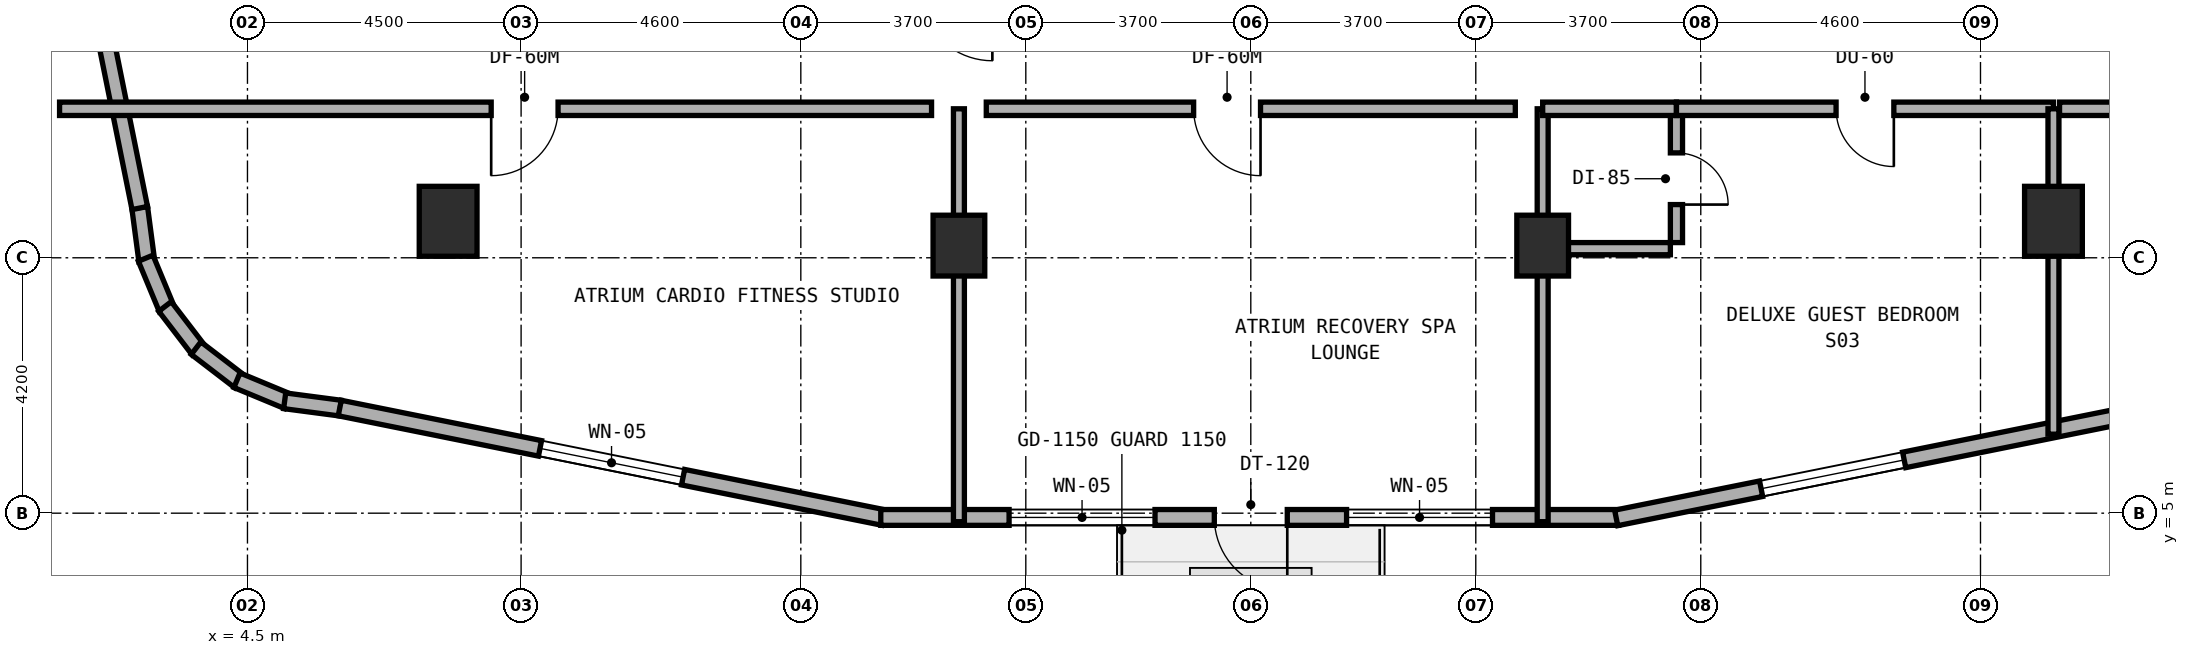
"""IFC4 building model, lengths in metres.
Left out: names, types, materials, properties, quantities, classifications, styles, units other than length and angle.
Written with IfcOpenShell. Run it as: python <this file> out.ifc"""

import sys

from ifc_helpers import new_model, si_unit, direction, frame, frame_2d, origin, origin_2d, place, context, subcontext, project, spatial, rectangle, extrude, element, fill, save


model = new_model("IFC4")
c1 = context("Model", 3, precision=1e-05, world=origin(), true_north=direction((0.0, 1.0)))
c2 = subcontext(c1, "Body", "Model", "MODEL_VIEW")
j1 = project(units=[si_unit("LENGTHUNIT", "METRE"), si_unit("PLANEANGLEUNIT", "RADIAN")], contexts=[c1])
p1 = place(None, origin())
s1 = spatial("IfcSite", under=j1, at=p1, CompositionType="ELEMENT")
p2 = place(p1, origin())
s2 = spatial("IfcBuilding", under=s1, at=p2, CompositionType="ELEMENT")
p3 = place(p2, frame((0.0, 0.0, 124.0)))
s3 = spatial("IfcBuildingStorey", under=s2, at=p3, CompositionType="ELEMENT", Elevation=124.0)
for number, where, z_axis, x_axis in (
    (1, (16.2, 9.4, 0.0), (0.0, 0.0, 1.0), (1.0, 0.0, 0.0)),
    (2, (25.8, 9.4, 0.0), (0.0, 0.0, 1.0), (1.0, 0.0, 0.0)),
):
    element("IfcColumn", number, at=place(p3, frame(where, z_axis=z_axis, x_axis=x_axis)), inside=s3, PredefinedType="COLUMN", context=c2, shape_type="SweptSolid", body=[
        extrude(rectangle(XDim=0.85, YDim=1.0, at=origin_2d()), origin(), (0.0, 0.0, 1.0), 3.5),
    ])
for number, where, z_axis, x_axis in (
    (3, (7.8, 9.8, 0.0), (0.0, 0.0, 1.0), (1.0, 0.0, 0.0)),
    (4, (34.2, 9.8, 0.0), (0.0, 0.0, 1.0), (1.0, 0.0, 0.0)),
):
    element("IfcColumn", number, at=place(p3, frame(where, z_axis=z_axis, x_axis=x_axis)), inside=s3, PredefinedType="COLUMN", context=c2, shape_type="SweptSolid", body=[
        extrude(rectangle(XDim=0.95, YDim=1.15, at=origin_2d()), origin(), (0.0, 0.0, 1.0), 3.5),
    ])
p4 = place(p3, frame((2.728, 10.025, 0.0), z_axis=(0.0, 0.0, 1.0), x_axis=(0.130953706898, -0.991388484223, 0.0)))
e5 = element("IfcWall", 5, at=p4, inside=s3, PredefinedType="STANDARD", context=c2, shape_type="SweptSolid", body=[
    extrude(rectangle(XDim=0.885, YDim=0.26, at=frame_2d((0.443, 0.0))), origin(), (0.0, 0.0, 1.0), 3.22),
])
p5 = place(p3, frame((2.826, 9.193, 0.0), z_axis=(0.0, 0.0, 1.0), x_axis=(0.383290660547, -0.923627776508, 0.0)))
e6 = element("IfcWall", 6, at=p5, inside=s3, PredefinedType="STANDARD", context=c2, shape_type="SweptSolid", body=[
    extrude(rectangle(XDim=0.903, YDim=0.26, at=frame_2d((0.452, 0.0))), origin(), (0.0, 0.0, 1.0), 3.22),
])
p6 = place(p3, frame((3.144, 8.399, 0.0), z_axis=(0.0, 0.0, 1.0), x_axis=(0.608624690463, -0.793458244748, 0.0)))
e7 = element("IfcWall", 7, at=p6, inside=s3, PredefinedType="STANDARD", context=c2, shape_type="SweptSolid", body=[
    extrude(rectangle(XDim=0.902, YDim=0.26, at=frame_2d((0.451, 0.0))), origin(), (0.0, 0.0, 1.0), 3.22),
])
p7 = place(p3, frame((3.655, 7.714, 0.0), z_axis=(0.0, 0.0, 1.0), x_axis=(0.793558456666, -0.608494022858, 0.0)))
e8 = element("IfcWall", 8, at=p7, inside=s3, PredefinedType="STANDARD", context=c2, shape_type="SweptSolid", body=[
    extrude(rectangle(XDim=0.902, YDim=0.26, at=frame_2d((0.451, 0.0))), origin(), (0.0, 0.0, 1.0), 3.22),
])
p8 = place(p3, frame((4.327, 7.186, 0.0), z_axis=(0.0, 0.0, 1.0), x_axis=(0.923683767999, -0.383155708213, 0.0)))
e9 = element("IfcWall", 9, at=p8, inside=s3, PredefinedType="STANDARD", context=c2, shape_type="SweptSolid", body=[
    extrude(rectangle(XDim=0.903, YDim=0.26, at=frame_2d((0.451, 0.0))), origin(), (0.0, 0.0, 1.0), 3.22),
])
p9 = place(p3, frame((5.112, 6.848, 0.0), z_axis=(0.0, 0.0, 1.0), x_axis=(0.991487658083, -0.130200706103, 0.0)))
e10 = element("IfcWall", 10, at=p9, inside=s3, PredefinedType="STANDARD", context=c2, shape_type="SweptSolid", body=[
    extrude(rectangle(XDim=0.921, YDim=0.26, at=frame_2d((0.46, 0.0))), origin(), (0.0, 0.0, 1.0), 3.22),
])
p10 = place(p3, frame((6.018, 6.729, 0.0), z_axis=(0.0, 0.0, 1.0), x_axis=(0.980317172899, -0.197429077186, 0.0)))
e11 = element("IfcWall", 11, at=p10, inside=s3, PredefinedType="STANDARD", context=c2, shape_type="SweptSolid", body=[
    extrude(rectangle(XDim=9.117, YDim=0.26, at=frame_2d((4.559, 0.0))), origin(), (0.0, 0.0, 1.0), 3.22),
])
p11 = place(p10, frame((3.359, 0.0, 0.8)))
e12 = element("IfcOpeningElement", 12, at=p11, cuts=e11, PredefinedType="OPENING", context=c2, shape_type="SweptSolid", body=[
    extrude(rectangle(XDim=2.4, YDim=1.6, at=frame_2d((1.2, 0.8))), frame((0.0, 0.14, 0.0), z_axis=(0.0, -1.0, 0.0), x_axis=(1.0, 0.0, 0.0)), (0.0, 0.0, 1.0), 0.28),
])
p12 = place(p3, frame((14.915, 4.93, 0.0), z_axis=(0.0, 0.0, 1.0), x_axis=(1.0, 0.0, 0.0)))
e13 = element("IfcWall", 13, at=p12, inside=s3, PredefinedType="STANDARD", context=c2, shape_type="SweptSolid", body=[
    extrude(rectangle(XDim=12.135, YDim=0.26, at=frame_2d((6.067, 0.0))), origin(), (0.0, 0.0, 1.0), 3.22),
])
p13 = place(p12, frame((5.485, 0.0, 0.0)))
e14 = element("IfcOpeningElement", 14, at=p13, cuts=e13, PredefinedType="OPENING", context=c2, shape_type="SweptSolid", body=[
    extrude(rectangle(XDim=1.2, YDim=2.15, at=frame_2d((0.6, 1.075))), frame((0.0, 0.14, 0.0), z_axis=(0.0, -1.0, 0.0), x_axis=(1.0, 0.0, 0.0)), (0.0, 0.0, 1.0), 0.28),
])
p14 = place(p12, frame((2.11, 0.0, 0.8)))
e15 = element("IfcOpeningElement", 15, at=p14, cuts=e13, PredefinedType="OPENING", context=c2, shape_type="SweptSolid", body=[
    extrude(rectangle(XDim=2.4, YDim=1.6, at=frame_2d((1.2, 0.8))), frame((0.0, 0.14, 0.0), z_axis=(0.0, -1.0, 0.0), x_axis=(1.0, 0.0, 0.0)), (0.0, 0.0, 1.0), 0.28),
])
p15 = place(p12, frame((7.66, 0.0, 0.8)))
e16 = element("IfcOpeningElement", 16, at=p15, cuts=e13, PredefinedType="OPENING", context=c2, shape_type="SweptSolid", body=[
    extrude(rectangle(XDim=2.4, YDim=1.6, at=frame_2d((1.2, 0.8))), frame((0.0, 0.14, 0.0), z_axis=(0.0, -1.0, 0.0), x_axis=(1.0, 0.0, 0.0)), (0.0, 0.0, 1.0), 0.28),
])
p16 = place(p3, frame((27.009, 4.922, 0.0), z_axis=(0.0, 0.0, 1.0), x_axis=(0.980321298532, 0.197408590603, 0.0)))
e17 = element("IfcWall", 17, at=p16, inside=s3, PredefinedType="STANDARD", context=c2, shape_type="SweptSolid", body=[
    extrude(rectangle(XDim=9.153, YDim=0.26, at=frame_2d((4.577, 0.0))), origin(), (0.0, 0.0, 1.0), 3.22),
])
p17 = place(p16, frame((2.431, 0.0, 0.8)))
e18 = element("IfcOpeningElement", 18, at=p17, cuts=e17, PredefinedType="OPENING", context=c2, shape_type="SweptSolid", body=[
    extrude(rectangle(XDim=2.4, YDim=1.6, at=frame_2d((1.2, 0.8))), frame((0.0, 0.14, 0.0), z_axis=(0.0, -1.0, 0.0), x_axis=(1.0, 0.0, 0.0)), (0.0, 0.0, 1.0), 0.28),
])
p18 = place(p3, frame((0.916, 19.02, 0.0), z_axis=(0.0, 0.0, 1.0), x_axis=(0.197435082048, -0.980315963543, 0.0)))
e19 = element("IfcWall", 19, at=p18, inside=s3, PredefinedType="STANDARD", context=c2, shape_type="SweptSolid", body=[
    extrude(rectangle(XDim=9.183, YDim=0.26, at=frame_2d((4.591, 0.0))), origin(), (0.0, 0.0, 1.0), 3.22),
])
p19 = place(p18, frame((2.497, 0.0, 0.8)))
e20 = element("IfcOpeningElement", 20, at=p19, cuts=e19, PredefinedType="OPENING", context=c2, shape_type="SweptSolid", body=[
    extrude(rectangle(XDim=2.4, YDim=1.6, at=frame_2d((1.2, 0.8))), frame((0.0, 0.14, 0.0), z_axis=(0.0, -1.0, 0.0), x_axis=(1.0, 0.0, 0.0)), (0.0, 0.0, 1.0), 0.28),
])
p20 = place(p3, frame((1.41, 11.65, 0.0), z_axis=(0.0, 0.0, 1.0), x_axis=(1.0, 0.0, 0.0)))
e21 = element("IfcWall", 21, at=p20, inside=s3, PredefinedType="SOLIDWALL", context=c2, shape_type="SweptSolid", body=[
    extrude(rectangle(XDim=14.34, YDim=0.22, at=frame_2d((7.17, 0.0))), origin(), (0.0, 0.0, 1.0), 2.695),
])
p21 = place(p20, frame((7.098, 0.0, 0.0)))
e22 = element("IfcOpeningElement", 22, at=p21, cuts=e21, PredefinedType="OPENING", context=c2, shape_type="SweptSolid", body=[
    extrude(rectangle(XDim=1.1, YDim=2.1, at=frame_2d((0.55, 1.05))), frame((0.0, 0.12, 0.0), z_axis=(0.0, -1.0, 0.0), x_axis=(1.0, 0.0, 0.0)), (0.0, 0.0, 1.0), 0.24),
])
p22 = place(p3, frame((16.2, 4.86, 0.0), z_axis=(0.0, 0.0, 1.0), x_axis=(0.0, 1.0, 0.0)))
e23 = element("IfcWall", 23, at=p22, inside=s3, PredefinedType="SOLIDWALL", context=c2, shape_type="SweptSolid", body=[
    extrude(rectangle(XDim=6.79, YDim=0.18, at=frame_2d((3.395, 0.0))), origin(), (0.0, 0.0, 1.0), 2.695),
])
p23 = place(p3, frame((16.65, 11.65, 0.0), z_axis=(0.0, 0.0, 1.0), x_axis=(1.0, 0.0, 0.0)))
e24 = element("IfcWall", 24, at=p23, inside=s3, PredefinedType="SOLIDWALL", context=c2, shape_type="SweptSolid", body=[
    extrude(rectangle(XDim=8.7, YDim=0.22, at=frame_2d((4.35, 0.0))), origin(), (0.0, 0.0, 1.0), 3.22),
])
p24 = place(p23, frame((3.41, 0.0, 0.0)))
e25 = element("IfcOpeningElement", 25, at=p24, cuts=e24, PredefinedType="OPENING", context=c2, shape_type="SweptSolid", body=[
    extrude(rectangle(XDim=1.1, YDim=2.1, at=frame_2d((0.55, 1.05))), frame((0.0, 0.12, 0.0), z_axis=(0.0, -1.0, 0.0), x_axis=(1.0, 0.0, 0.0)), (0.0, 0.0, 1.0), 0.24),
])
p25 = place(p3, frame((25.8, 4.86, 0.0), z_axis=(0.0, 0.0, 1.0), x_axis=(0.0, 1.0, 0.0)))
e26 = element("IfcWall", 26, at=p25, inside=s3, PredefinedType="SOLIDWALL", context=c2, shape_type="SweptSolid", body=[
    extrude(rectangle(XDim=6.79, YDim=0.18, at=frame_2d((3.395, 0.0))), origin(), (0.0, 0.0, 1.0), 2.695),
])
p26 = place(p3, frame((28.0, 9.45, 0.0), z_axis=(0.0, 0.0, 1.0), x_axis=(0.0, 1.0, 0.0)))
e27 = element("IfcWall", 27, at=p26, inside=s3, PredefinedType="PLUMBINGWALL", context=c2, shape_type="SweptSolid", body=[
    extrude(rectangle(XDim=2.1, YDim=0.2, at=frame_2d((1.05, 0.0))), origin(), (0.0, 0.0, 1.0), 2.835),
])
p27 = place(p26, frame((0.625, 0.0, 0.0)))
e28 = element("IfcOpeningElement", 28, at=p27, cuts=e27, PredefinedType="OPENING", context=c2, shape_type="SweptSolid", body=[
    extrude(rectangle(XDim=0.85, YDim=2.1, at=frame_2d((0.425, 1.05))), frame((0.0, 0.11, 0.0), z_axis=(0.0, -1.0, 0.0), x_axis=(1.0, 0.0, 0.0)), (0.0, 0.0, 1.0), 0.22),
])
p28 = place(p3, frame((25.9, 9.35, 0.0), z_axis=(0.0, 0.0, 1.0), x_axis=(1.0, 0.0, 0.0)))
e29 = element("IfcWall", 29, at=p28, inside=s3, PredefinedType="PLUMBINGWALL", context=c2, shape_type="SweptSolid", body=[
    extrude(rectangle(XDim=2.0, YDim=0.2, at=frame_2d((1.0, 0.0))), origin(), (0.0, 0.0, 1.0), 2.835),
])
p29 = place(p3, frame((25.8, 11.65, 0.0), z_axis=(0.0, 0.0, 1.0), x_axis=(1.0, 0.0, 0.0)))
e30 = element("IfcWall", 30, at=p29, inside=s3, PredefinedType="SOLIDWALL", context=c2, shape_type="SweptSolid", body=[
    extrude(rectangle(XDim=2.2, YDim=0.22, at=frame_2d((1.1, 0.0))), origin(), (0.0, 0.0, 1.0), 2.695),
])
p30 = place(p3, frame((28.0, 11.65, 0.0), z_axis=(0.0, 0.0, 1.0), x_axis=(1.0, 0.0, 0.0)))
e31 = element("IfcWall", 31, at=p30, inside=s3, PredefinedType="SOLIDWALL", context=c2, shape_type="SweptSolid", body=[
    extrude(rectangle(XDim=6.2, YDim=0.22, at=frame_2d((3.1, 0.0))), origin(), (0.0, 0.0, 1.0), 2.695),
])
p31 = place(p30, frame((2.625, 0.0, 0.0)))
e32 = element("IfcOpeningElement", 32, at=p31, cuts=e31, PredefinedType="OPENING", context=c2, shape_type="SweptSolid", body=[
    extrude(rectangle(XDim=0.95, YDim=2.1, at=frame_2d((0.475, 1.05))), frame((0.0, 0.12, 0.0), z_axis=(0.0, -1.0, 0.0), x_axis=(1.0, 0.0, 0.0)), (0.0, 0.0, 1.0), 0.24),
])
p32 = place(p3, frame((34.2, 6.299, 0.0), z_axis=(0.0, 0.0, 1.0), x_axis=(0.0, 1.0, 0.0)))
e33 = element("IfcWall", 33, at=p32, inside=s3, PredefinedType="SOLIDWALL", context=c2, shape_type="SweptSolid", body=[
    extrude(rectangle(XDim=5.351, YDim=0.18, at=frame_2d((2.675, 0.0))), origin(), (0.0, 0.0, 1.0), 2.695),
])
p33 = place(p3, frame((34.3, 11.65, 0.0), z_axis=(0.0, 0.0, 1.0), x_axis=(1.0, 0.0, 0.0)))
e34 = element("IfcWall", 34, at=p33, inside=s3, PredefinedType="SOLIDWALL", context=c2, shape_type="SweptSolid", body=[
    extrude(rectangle(XDim=6.64, YDim=0.22, at=frame_2d((3.32, 0.0))), origin(), (0.0, 0.0, 1.0), 2.835),
])
p34 = place(p33, frame((2.55, 0.0, 0.0)))
e35 = element("IfcOpeningElement", 35, at=p34, cuts=e34, PredefinedType="OPENING", context=c2, shape_type="SweptSolid", body=[
    extrude(rectangle(XDim=0.95, YDim=2.1, at=frame_2d((0.475, 1.05))), frame((0.0, 0.12, 0.0), z_axis=(0.0, -1.0, 0.0), x_axis=(1.0, 0.0, 0.0)), (0.0, 0.0, 1.0), 0.24),
])
p35 = place(p11, origin())
e36 = element("IfcWindow", 36, at=p35, inside=s3, PartitioningType="SINGLE_PANEL", PredefinedType="WINDOW", context=c2, shape_type="SweptSolid", body=[
    extrude(rectangle(XDim=2.4, YDim=1.6, at=frame_2d((1.2, 0.8))), frame((0.0, 0.03, 0.0), z_axis=(0.0, -1.0, 0.0), x_axis=(1.0, 0.0, 0.0)), (0.0, 0.0, 1.0), 0.06),
])
fill(e12, e36)
p36 = place(p13, frame((1.2, 0.0, 0.0), z_axis=(0.0, 0.0, 1.0), x_axis=(-1.0, 0.0, 0.0)))
e37 = element("IfcDoor", 37, at=p36, inside=s3, OperationType="SINGLE_SWING_LEFT", PredefinedType="DOOR", context=c2, shape_type="SweptSolid", body=[
    extrude(rectangle(XDim=1.2, YDim=2.15, at=frame_2d((0.6, 1.075))), frame((0.0, 0.025, 0.0), z_axis=(0.0, -1.0, 0.0), x_axis=(1.0, 0.0, 0.0)), (0.0, 0.0, 1.0), 0.05),
])
fill(e14, e37)
p37 = place(p14, origin())
e38 = element("IfcWindow", 38, at=p37, inside=s3, PartitioningType="SINGLE_PANEL", PredefinedType="WINDOW", context=c2, shape_type="SweptSolid", body=[
    extrude(rectangle(XDim=2.4, YDim=1.6, at=frame_2d((1.2, 0.8))), frame((0.0, 0.03, 0.0), z_axis=(0.0, -1.0, 0.0), x_axis=(1.0, 0.0, 0.0)), (0.0, 0.0, 1.0), 0.06),
])
fill(e15, e38)
p38 = place(p15, origin())
e39 = element("IfcWindow", 39, at=p38, inside=s3, PartitioningType="SINGLE_PANEL", PredefinedType="WINDOW", context=c2, shape_type="SweptSolid", body=[
    extrude(rectangle(XDim=2.4, YDim=1.6, at=frame_2d((1.2, 0.8))), frame((0.0, 0.03, 0.0), z_axis=(0.0, -1.0, 0.0), x_axis=(1.0, 0.0, 0.0)), (0.0, 0.0, 1.0), 0.06),
])
fill(e16, e39)
p39 = place(p17, origin())
e40 = element("IfcWindow", 40, at=p39, inside=s3, PartitioningType="SINGLE_PANEL", PredefinedType="WINDOW", context=c2, shape_type="SweptSolid", body=[
    extrude(rectangle(XDim=2.4, YDim=1.6, at=frame_2d((1.2, 0.8))), frame((0.0, 0.03, 0.0), z_axis=(0.0, -1.0, 0.0), x_axis=(1.0, 0.0, 0.0)), (0.0, 0.0, 1.0), 0.06),
])
fill(e18, e40)
p40 = place(p21, frame((1.1, 0.0, 0.0), z_axis=(0.0, 0.0, 1.0), x_axis=(-1.0, 0.0, 0.0)))
e41 = element("IfcDoor", 41, at=p40, inside=s3, OperationType="SINGLE_SWING_RIGHT", PredefinedType="DOOR", context=c2, shape_type="SweptSolid", body=[
    extrude(rectangle(XDim=1.1, YDim=2.1, at=frame_2d((0.55, 1.05))), frame((0.0, 0.025, 0.0), z_axis=(0.0, -1.0, 0.0), x_axis=(1.0, 0.0, 0.0)), (0.0, 0.0, 1.0), 0.05),
])
fill(e22, e41)
p41 = place(p24, frame((1.1, 0.0, 0.0), z_axis=(0.0, 0.0, 1.0), x_axis=(-1.0, 0.0, 0.0)))
e42 = element("IfcDoor", 42, at=p41, inside=s3, OperationType="SINGLE_SWING_LEFT", PredefinedType="DOOR", context=c2, shape_type="SweptSolid", body=[
    extrude(rectangle(XDim=1.1, YDim=2.1, at=frame_2d((0.55, 1.05))), frame((0.0, 0.025, 0.0), z_axis=(0.0, -1.0, 0.0), x_axis=(1.0, 0.0, 0.0)), (0.0, 0.0, 1.0), 0.05),
])
fill(e25, e42)
p42 = place(p27, frame((0.85, 0.0, 0.0), z_axis=(0.0, 0.0, 1.0), x_axis=(-1.0, 0.0, 0.0)))
e43 = element("IfcDoor", 43, at=p42, inside=s3, OperationType="SINGLE_SWING_RIGHT", PredefinedType="DOOR", context=c2, shape_type="SweptSolid", body=[
    extrude(rectangle(XDim=0.85, YDim=2.1, at=frame_2d((0.425, 1.05))), frame((0.0, 0.025, 0.0), z_axis=(0.0, -1.0, 0.0), x_axis=(1.0, 0.0, 0.0)), (0.0, 0.0, 1.0), 0.05),
])
fill(e28, e43)
p43 = place(p31, frame((0.95, 0.0, 0.0), z_axis=(0.0, 0.0, 1.0), x_axis=(-1.0, 0.0, 0.0)))
e44 = element("IfcDoor", 44, at=p43, inside=s3, OperationType="SINGLE_SWING_LEFT", PredefinedType="DOOR", context=c2, shape_type="SweptSolid", body=[
    extrude(rectangle(XDim=0.95, YDim=2.1, at=frame_2d((0.475, 1.05))), frame((0.0, 0.025, 0.0), z_axis=(0.0, -1.0, 0.0), x_axis=(1.0, 0.0, 0.0)), (0.0, 0.0, 1.0), 0.05),
])
fill(e32, e44)
save(model, sys.argv[1])
